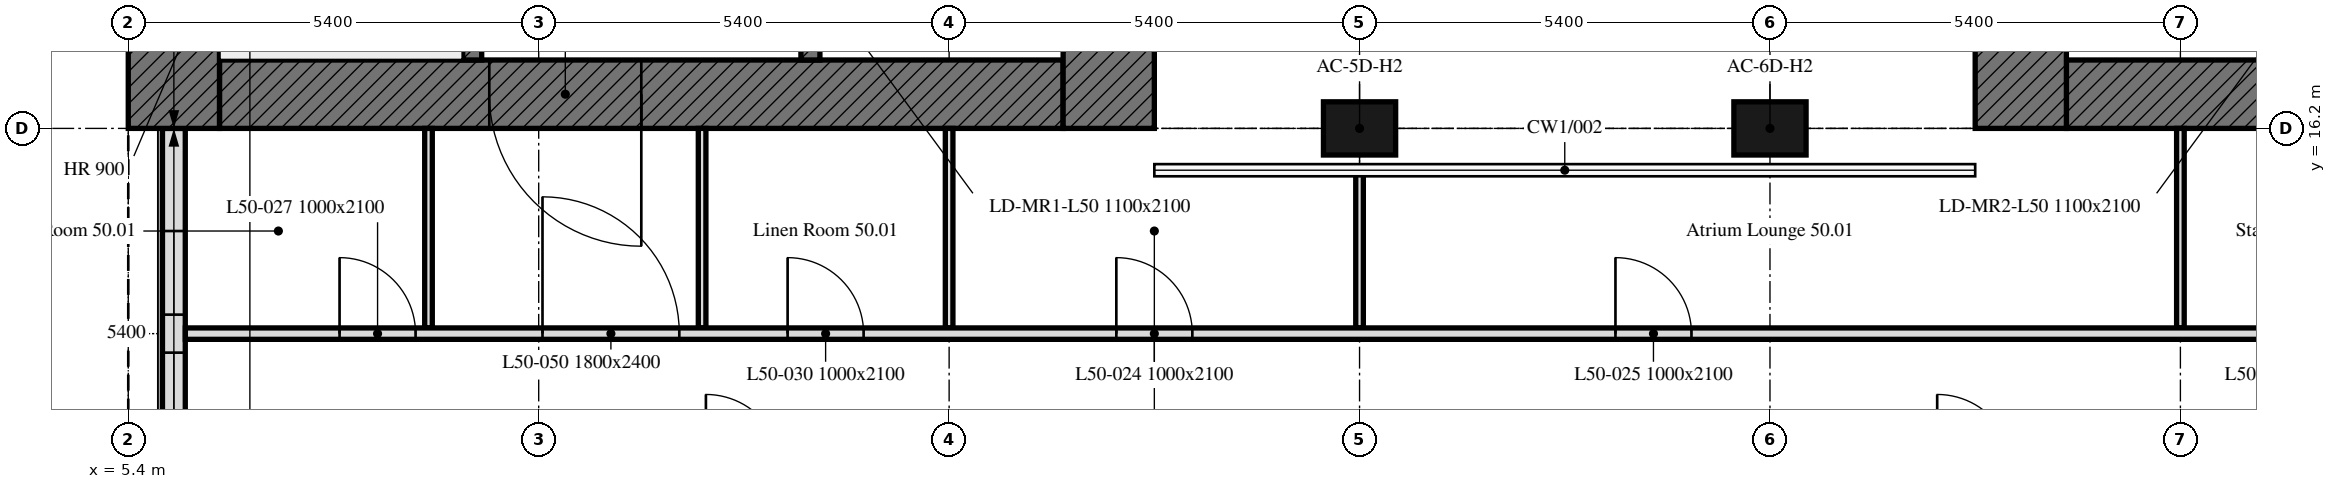
"""IFC4 building model, lengths in metres.
Left out: names, types, materials, properties, quantities, classifications, styles, units other than length and angle.
Written with IfcOpenShell. Run it as: python <this file> out.ifc"""

import sys

from ifc_helpers import new_model, si_unit, direction, frame, frame_2d, origin, origin_2d, place, context, subcontext, project, spatial, rectangle, extrude, element, fill, save


model = new_model("IFC4")
c1 = context("Model", 3, precision=1e-05, world=origin(), true_north=direction((0.0, 1.0)))
c2 = subcontext(c1, "Body", "Model", "MODEL_VIEW")
j1 = project(units=[si_unit("LENGTHUNIT", "METRE"), si_unit("PLANEANGLEUNIT", "RADIAN")], contexts=[c1])
p1 = place(None, origin())
s1 = spatial("IfcSite", under=j1, at=p1, CompositionType="ELEMENT")
p2 = place(p1, origin())
s2 = spatial("IfcBuilding", under=s1, at=p2, CompositionType="ELEMENT")
p3 = place(p2, frame((0.0, 0.0, 203.8)))
s3 = spatial("IfcBuildingStorey", under=s2, at=p3, CompositionType="ELEMENT", Elevation=203.8)
for number, where, z_axis, x_axis in (
    (1, (21.6, 16.2, 0.0), (0.0, 0.0, 1.0), (1.0, 0.0, 0.0)),
    (2, (27.0, 16.2, 0.0), (0.0, 0.0, 1.0), (1.0, 0.0, 0.0)),
):
    element("IfcColumn", number, at=place(p3, frame(where, z_axis=z_axis, x_axis=x_axis)), inside=s3, PredefinedType="COLUMN", context=c2, shape_type="SweptSolid", body=[
        extrude(rectangle(XDim=0.95, YDim=0.7, at=origin_2d()), origin(), (0.0, 0.0, 1.0), 3.0),
    ])
p4 = place(p3, frame((6.0, 16.2, 0.0), z_axis=(0.0, 0.0, 1.0), x_axis=(0.0, -1.0, 0.0)))
e3 = element("IfcWall", 3, at=p4, inside=s3, PredefinedType="SOLIDWALL", context=c2, shape_type="SweptSolid", body=[
    extrude(rectangle(XDim=5.214, YDim=0.3, at=frame_2d((2.607, 0.0))), origin(), (0.0, 0.0, 1.0), 3.0),
])
p5 = place(p4, frame((1.35, 0.0, 0.9)))
e4 = element("IfcOpeningElement", 4, at=p5, cuts=e3, PredefinedType="OPENING", context=c2, shape_type="SweptSolid", body=[
    extrude(rectangle(XDim=1.1, YDim=1.7, at=frame_2d((0.55, 0.85))), frame((0.0, 0.16, 0.0), z_axis=(0.0, -1.0, 0.0), x_axis=(1.0, 0.0, 0.0)), (0.0, 0.0, 1.0), 0.32),
])
p6 = place(p4, frame((2.95, 0.0, 0.9)))
e5 = element("IfcOpeningElement", 5, at=p6, cuts=e3, PredefinedType="OPENING", context=c2, shape_type="SweptSolid", body=[
    extrude(rectangle(XDim=1.1, YDim=1.7, at=frame_2d((0.55, 0.85))), frame((0.0, 0.16, 0.0), z_axis=(0.0, -1.0, 0.0), x_axis=(1.0, 0.0, 0.0)), (0.0, 0.0, 1.0), 0.32),
])
p7 = place(p3, frame((17.7, 16.65, 0.0), z_axis=(0.0, 0.0, 1.0), x_axis=(-1.0, 0.0, 0.0)))
e6 = element("IfcWall", 6, at=p7, inside=s3, PredefinedType="SOLIDWALL", context=c2, shape_type="SweptSolid", body=[
    extrude(rectangle(XDim=11.1, YDim=0.9, at=frame_2d((5.55, 0.0))), origin(), (0.0, 0.0, 1.0), 3.0),
])
p8 = place(p7, frame((5.55, 0.0, 0.0)))
e7 = element("IfcOpeningElement", 7, at=p8, cuts=e6, PredefinedType="OPENING", context=c2, shape_type="SweptSolid", body=[
    extrude(rectangle(XDim=2.0, YDim=2.4, at=frame_2d((1.0, 1.2))), frame((0.0, 0.45, 0.0), z_axis=(0.0, -1.0, 0.0), x_axis=(1.0, 0.0, 0.0)), (0.0, 0.0, 1.0), 0.9),
])
for number, where, z_axis, x_axis in (
    (8, (6.0, 16.2, 0.0), (0.0, 0.0, 1.0), (0.0, 1.0, 0.0)),
    (9, (18.3, 32.4, 0.0), (0.0, 0.0, 1.0), (0.0, -1.0, 0.0)),
):
    element("IfcWall", number, at=place(p3, frame(where, z_axis=z_axis, x_axis=x_axis)), inside=s3, PredefinedType="SOLIDWALL", context=c2, shape_type="SweptSolid", body=[
        extrude(rectangle(XDim=16.2, YDim=1.2, at=frame_2d((8.1, 0.0))), origin(), (0.0, 0.0, 1.0), 3.0),
    ])
p9 = place(p3, frame((9.925, 17.1, 0.0), z_axis=(0.0, 0.0, 1.0), x_axis=(0.0, 1.0, 0.0)))
e10 = element("IfcWall", 10, at=p9, inside=s3, PredefinedType="SOLIDWALL", context=c2, shape_type="SweptSolid", body=[
    extrude(rectangle(XDim=14.4, YDim=0.25, at=frame_2d((7.2, 0.0))), origin(), (0.0, 0.0, 1.0), 3.0),
])
p10 = place(p9, frame((4.6, 0.0, 0.0)))
e11 = element("IfcOpeningElement", 11, at=p10, cuts=e10, PredefinedType="OPENING", context=c2, shape_type="SweptSolid", body=[
    extrude(rectangle(XDim=1.0, YDim=2.1, at=frame_2d((0.5, 1.05))), frame((0.0, 0.125, 0.0), z_axis=(0.0, -1.0, 0.0), x_axis=(1.0, 0.0, 0.0)), (0.0, 0.0, 1.0), 0.25),
])
p11 = place(p9, frame((7.062, 0.0, 0.0)))
e12 = element("IfcOpeningElement", 12, at=p11, cuts=e10, PredefinedType="OPENING", context=c2, shape_type="SweptSolid", body=[
    extrude(rectangle(XDim=1.2, YDim=2.1, at=frame_2d((0.6, 1.05))), frame((0.0, 0.125, 0.0), z_axis=(0.0, -1.0, 0.0), x_axis=(1.0, 0.0, 0.0)), (0.0, 0.0, 1.0), 0.25),
])
p12 = place(p9, frame((9.979, 0.0, 0.0)))
e13 = element("IfcOpeningElement", 13, at=p12, cuts=e10, PredefinedType="OPENING", context=c2, shape_type="SweptSolid", body=[
    extrude(rectangle(XDim=0.9, YDim=2.1, at=frame_2d((0.45, 1.05))), frame((0.0, 0.125, 0.0), z_axis=(0.0, -1.0, 0.0), x_axis=(1.0, 0.0, 0.0)), (0.0, 0.0, 1.0), 0.25),
])
p13 = place(p9, frame((11.92, 0.0, 0.0)))
e14 = element("IfcOpeningElement", 14, at=p13, cuts=e10, PredefinedType="OPENING", context=c2, shape_type="SweptSolid", body=[
    extrude(rectangle(XDim=0.9, YDim=2.1, at=frame_2d((0.45, 1.05))), frame((0.0, 0.125, 0.0), z_axis=(0.0, -1.0, 0.0), x_axis=(1.0, 0.0, 0.0)), (0.0, 0.0, 1.0), 0.25),
])
p14 = place(p9, frame((13.354, 0.0, 0.0)))
e15 = element("IfcOpeningElement", 15, at=p14, cuts=e10, PredefinedType="OPENING", context=c2, shape_type="SweptSolid", body=[
    extrude(rectangle(XDim=0.9, YDim=2.1, at=frame_2d((0.45, 1.05))), frame((0.0, 0.125, 0.0), z_axis=(0.0, -1.0, 0.0), x_axis=(1.0, 0.0, 0.0)), (0.0, 0.0, 1.0), 0.25),
])
p15 = place(p3, frame((14.375, 17.1, 0.0), z_axis=(0.0, 0.0, 1.0), x_axis=(0.0, 1.0, 0.0)))
e16 = element("IfcWall", 16, at=p15, inside=s3, PredefinedType="SOLIDWALL", context=c2, shape_type="SweptSolid", body=[
    extrude(rectangle(XDim=14.4, YDim=0.25, at=frame_2d((7.2, 0.0))), origin(), (0.0, 0.0, 1.0), 3.0),
])
p16 = place(p15, frame((13.15, 0.0, 0.0)))
e17 = element("IfcOpeningElement", 17, at=p16, cuts=e16, PredefinedType="OPENING", context=c2, shape_type="SweptSolid", body=[
    extrude(rectangle(XDim=1.0, YDim=2.1, at=frame_2d((0.5, 1.05))), frame((0.0, 0.125, 0.0), z_axis=(0.0, -1.0, 0.0), x_axis=(1.0, 0.0, 0.0)), (0.0, 0.0, 1.0), 0.25),
])
p17 = place(p15, frame((0.6, 0.0, 0.0)))
e18 = element("IfcOpeningElement", 18, at=p17, cuts=e16, PredefinedType="OPENING", context=c2, shape_type="SweptSolid", body=[
    extrude(rectangle(XDim=1.1, YDim=2.1, at=frame_2d((0.55, 1.05))), frame((0.0, 0.125, 0.0), z_axis=(0.0, -1.0, 0.0), x_axis=(1.0, 0.0, 0.0)), (0.0, 0.0, 1.0), 0.25),
])
p18 = place(p15, frame((3.25, 0.0, 0.0)))
e19 = element("IfcOpeningElement", 19, at=p18, cuts=e16, PredefinedType="OPENING", context=c2, shape_type="SweptSolid", body=[
    extrude(rectangle(XDim=0.9, YDim=2.1, at=frame_2d((0.45, 1.05))), frame((0.0, 0.125, 0.0), z_axis=(0.0, -1.0, 0.0), x_axis=(1.0, 0.0, 0.0)), (0.0, 0.0, 1.0), 0.25),
])
p19 = place(p3, frame((42.0, 16.65, 0.0), z_axis=(0.0, 0.0, 1.0), x_axis=(-1.0, 0.0, 0.0)))
e20 = element("IfcWall", 20, at=p19, inside=s3, PredefinedType="SOLIDWALL", context=c2, shape_type="SweptSolid", body=[
    extrude(rectangle(XDim=11.1, YDim=0.9, at=frame_2d((5.55, 0.0))), origin(), (0.0, 0.0, 1.0), 3.0),
])
p20 = place(p19, frame((3.55, 0.0, 0.0)))
e21 = element("IfcOpeningElement", 21, at=p20, cuts=e20, PredefinedType="OPENING", context=c2, shape_type="SweptSolid", body=[
    extrude(rectangle(XDim=2.0, YDim=2.4, at=frame_2d((1.0, 1.2))), frame((0.0, 0.45, 0.0), z_axis=(0.0, -1.0, 0.0), x_axis=(1.0, 0.0, 0.0)), (0.0, 0.0, 1.0), 0.9),
])
p21 = place(p3, frame((30.3, 16.2, 0.0), z_axis=(0.0, 0.0, 1.0), x_axis=(0.0, 1.0, 0.0)))
e22 = element("IfcWall", 22, at=p21, inside=s3, PredefinedType="SOLIDWALL", context=c2, shape_type="SweptSolid", body=[
    extrude(rectangle(XDim=16.2, YDim=1.2, at=frame_2d((8.1, 0.0))), origin(), (0.0, 0.0, 1.0), 3.0),
])
p22 = place(p3, frame((16.2, 16.2, 0.0), z_axis=(0.0, 0.0, 1.0), x_axis=(0.0, -1.0, 0.0)))
e23 = element("IfcWall", 23, at=p22, inside=s3, PredefinedType="PARTITIONING", context=c2, shape_type="SweptSolid", body=[
    extrude(rectangle(XDim=2.625, YDim=0.1, at=frame_2d((1.312, 0.0))), origin(), (0.0, 0.0, 1.0), 3.0),
])
p23 = place(p3, frame((21.6, 13.575, 0.0), z_axis=(0.0, 0.0, 1.0), x_axis=(0.0, 1.0, 0.0)))
e24 = element("IfcWall", 24, at=p23, inside=s3, PredefinedType="PARTITIONING", context=c2, shape_type="SweptSolid", body=[
    extrude(rectangle(XDim=2.13, YDim=0.1, at=frame_2d((1.065, 0.0))), origin(), (0.0, 0.0, 1.0), 3.0),
])
for number, where, z_axis, x_axis in (
    (25, (32.4, 13.575, 0.0), (0.0, 0.0, 1.0), (0.0, 1.0, 0.0)),
    (26, (9.35, 16.2, 0.0), (0.0, 0.0, 1.0), (0.0, -1.0, 0.0)),
    (27, (12.95, 13.575, 0.0), (0.0, 0.0, 1.0), (0.0, 1.0, 0.0)),
):
    element("IfcWall", number, at=place(p3, frame(where, z_axis=z_axis, x_axis=x_axis)), inside=s3, PredefinedType="PARTITIONING", context=c2, shape_type="SweptSolid", body=[
        extrude(rectangle(XDim=2.625, YDim=0.1, at=frame_2d((1.312, 0.0))), origin(), (0.0, 0.0, 1.0), 3.0),
    ])
p24 = place(p3, frame((6.151, 13.5, 0.0), z_axis=(0.0, 0.0, 1.0), x_axis=(1.0, 0.0, 0.0)))
e28 = element("IfcWall", 28, at=p24, inside=s3, PredefinedType="PARTITIONING", context=c2, shape_type="SweptSolid", body=[
    extrude(rectangle(XDim=36.974, YDim=0.15, at=frame_2d((18.487, 0.0))), origin(), (0.0, 0.0, 1.0), 3.0),
])
p25 = place(p24, frame((12.249, 0.0, 0.0)))
e29 = element("IfcOpeningElement", 29, at=p25, cuts=e28, PredefinedType="OPENING", context=c2, shape_type="SweptSolid", body=[
    extrude(rectangle(XDim=1.0, YDim=2.1, at=frame_2d((0.5, 1.05))), frame((0.0, 0.075, 0.0), z_axis=(0.0, -1.0, 0.0), x_axis=(1.0, 0.0, 0.0)), (0.0, 0.0, 1.0), 0.15),
])
p26 = place(p24, frame((18.816, 0.0, 0.0)))
e30 = element("IfcOpeningElement", 30, at=p26, cuts=e28, PredefinedType="OPENING", context=c2, shape_type="SweptSolid", body=[
    extrude(rectangle(XDim=1.0, YDim=2.1, at=frame_2d((0.5, 1.05))), frame((0.0, 0.075, 0.0), z_axis=(0.0, -1.0, 0.0), x_axis=(1.0, 0.0, 0.0)), (0.0, 0.0, 1.0), 0.15),
])
p27 = place(p24, frame((2.029, 0.0, 0.0)))
e31 = element("IfcOpeningElement", 31, at=p27, cuts=e28, PredefinedType="OPENING", context=c2, shape_type="SweptSolid", body=[
    extrude(rectangle(XDim=1.0, YDim=2.1, at=frame_2d((0.5, 1.05))), frame((0.0, 0.075, 0.0), z_axis=(0.0, -1.0, 0.0), x_axis=(1.0, 0.0, 0.0)), (0.0, 0.0, 1.0), 0.15),
])
p28 = place(p24, frame((27.374, 0.0, 0.0)))
e32 = element("IfcOpeningElement", 32, at=p28, cuts=e28, PredefinedType="OPENING", context=c2, shape_type="SweptSolid", body=[
    extrude(rectangle(XDim=1.0, YDim=2.1, at=frame_2d((0.5, 1.05))), frame((0.0, 0.075, 0.0), z_axis=(0.0, -1.0, 0.0), x_axis=(1.0, 0.0, 0.0)), (0.0, 0.0, 1.0), 0.15),
])
p29 = place(p24, frame((34.574, 0.0, 0.0)))
e33 = element("IfcOpeningElement", 33, at=p29, cuts=e28, PredefinedType="OPENING", context=c2, shape_type="SweptSolid", body=[
    extrude(rectangle(XDim=1.0, YDim=2.1, at=frame_2d((0.5, 1.05))), frame((0.0, 0.075, 0.0), z_axis=(0.0, -1.0, 0.0), x_axis=(1.0, 0.0, 0.0)), (0.0, 0.0, 1.0), 0.15),
])
p30 = place(p24, frame((7.924, 0.0, 0.0)))
e34 = element("IfcOpeningElement", 34, at=p30, cuts=e28, PredefinedType="OPENING", context=c2, shape_type="SweptSolid", body=[
    extrude(rectangle(XDim=1.0, YDim=2.1, at=frame_2d((0.5, 1.05))), frame((0.0, 0.075, 0.0), z_axis=(0.0, -1.0, 0.0), x_axis=(1.0, 0.0, 0.0)), (0.0, 0.0, 1.0), 0.15),
])
p31 = place(p24, frame((4.699, 0.0, 0.0)))
e35 = element("IfcOpeningElement", 35, at=p31, cuts=e28, PredefinedType="OPENING", context=c2, shape_type="SweptSolid", body=[
    extrude(rectangle(XDim=1.8, YDim=2.4, at=frame_2d((0.9, 1.2))), frame((0.0, 0.075, 0.0), z_axis=(0.0, -1.0, 0.0), x_axis=(1.0, 0.0, 0.0)), (0.0, 0.0, 1.0), 0.15),
])
p32 = place(p24, frame((29.799, 0.0, 0.0)))
e36 = element("IfcOpeningElement", 36, at=p32, cuts=e28, PredefinedType="OPENING", context=c2, shape_type="SweptSolid", body=[
    extrude(rectangle(XDim=1.8, YDim=2.4, at=frame_2d((0.9, 1.2))), frame((0.0, 0.075, 0.0), z_axis=(0.0, -1.0, 0.0), x_axis=(1.0, 0.0, 0.0)), (0.0, 0.0, 1.0), 0.15),
])
p33 = place(p5, origin())
e37 = element("IfcWindow", 37, at=p33, inside=s3, PartitioningType="SINGLE_PANEL", PredefinedType="WINDOW", context=c2, shape_type="SweptSolid", body=[
    extrude(rectangle(XDim=1.1, YDim=1.7, at=frame_2d((0.55, 0.85))), frame((0.0, 0.03, 0.0), z_axis=(0.0, -1.0, 0.0), x_axis=(1.0, 0.0, 0.0)), (0.0, 0.0, 1.0), 0.06),
])
fill(e4, e37)
p34 = place(p6, origin())
e38 = element("IfcWindow", 38, at=p34, inside=s3, PartitioningType="SINGLE_PANEL", PredefinedType="WINDOW", context=c2, shape_type="SweptSolid", body=[
    extrude(rectangle(XDim=1.1, YDim=1.7, at=frame_2d((0.55, 0.85))), frame((0.0, 0.03, 0.0), z_axis=(0.0, -1.0, 0.0), x_axis=(1.0, 0.0, 0.0)), (0.0, 0.0, 1.0), 0.06),
])
fill(e5, e38)
p35 = place(p8, origin())
e39 = element("IfcDoor", 39, at=p35, inside=s3, OperationType="DOUBLE_DOOR_SINGLE_SWING", PredefinedType="DOOR", context=c2, shape_type="SweptSolid", body=[
    extrude(rectangle(XDim=2.0, YDim=2.4, at=frame_2d((1.0, 1.2))), frame((0.0, 0.025, 0.0), z_axis=(0.0, -1.0, 0.0), x_axis=(1.0, 0.0, 0.0)), (0.0, 0.0, 1.0), 0.05),
])
fill(e7, e39)
p36 = place(p25, origin())
e40 = element("IfcDoor", 40, at=p36, inside=s3, OperationType="SINGLE_SWING_RIGHT", PredefinedType="DOOR", context=c2, shape_type="SweptSolid", body=[
    extrude(rectangle(XDim=1.0, YDim=2.1, at=frame_2d((0.5, 1.05))), frame((0.0, 0.025, 0.0), z_axis=(0.0, -1.0, 0.0), x_axis=(1.0, 0.0, 0.0)), (0.0, 0.0, 1.0), 0.05),
])
fill(e29, e40)
p37 = place(p26, origin())
e41 = element("IfcDoor", 41, at=p37, inside=s3, OperationType="SINGLE_SWING_RIGHT", PredefinedType="DOOR", context=c2, shape_type="SweptSolid", body=[
    extrude(rectangle(XDim=1.0, YDim=2.1, at=frame_2d((0.5, 1.05))), frame((0.0, 0.025, 0.0), z_axis=(0.0, -1.0, 0.0), x_axis=(1.0, 0.0, 0.0)), (0.0, 0.0, 1.0), 0.05),
])
fill(e30, e41)
p38 = place(p27, origin())
e42 = element("IfcDoor", 42, at=p38, inside=s3, OperationType="SINGLE_SWING_LEFT", PredefinedType="DOOR", context=c2, shape_type="SweptSolid", body=[
    extrude(rectangle(XDim=1.0, YDim=2.1, at=frame_2d((0.5, 1.05))), frame((0.0, 0.025, 0.0), z_axis=(0.0, -1.0, 0.0), x_axis=(1.0, 0.0, 0.0)), (0.0, 0.0, 1.0), 0.05),
])
fill(e31, e42)
p39 = place(p30, origin())
e43 = element("IfcDoor", 43, at=p39, inside=s3, OperationType="SINGLE_SWING_RIGHT", PredefinedType="DOOR", context=c2, shape_type="SweptSolid", body=[
    extrude(rectangle(XDim=1.0, YDim=2.1, at=frame_2d((0.5, 1.05))), frame((0.0, 0.025, 0.0), z_axis=(0.0, -1.0, 0.0), x_axis=(1.0, 0.0, 0.0)), (0.0, 0.0, 1.0), 0.05),
])
fill(e34, e43)
p40 = place(p31, origin())
e44 = element("IfcDoor", 44, at=p40, inside=s3, OperationType="DOUBLE_DOOR_SINGLE_SWING", PredefinedType="DOOR", context=c2, shape_type="SweptSolid", body=[
    extrude(rectangle(XDim=1.8, YDim=2.4, at=frame_2d((0.9, 1.2))), frame((0.0, 0.025, 0.0), z_axis=(0.0, -1.0, 0.0), x_axis=(1.0, 0.0, 0.0)), (0.0, 0.0, 1.0), 0.05),
])
fill(e35, e44)
save(model, sys.argv[1])
